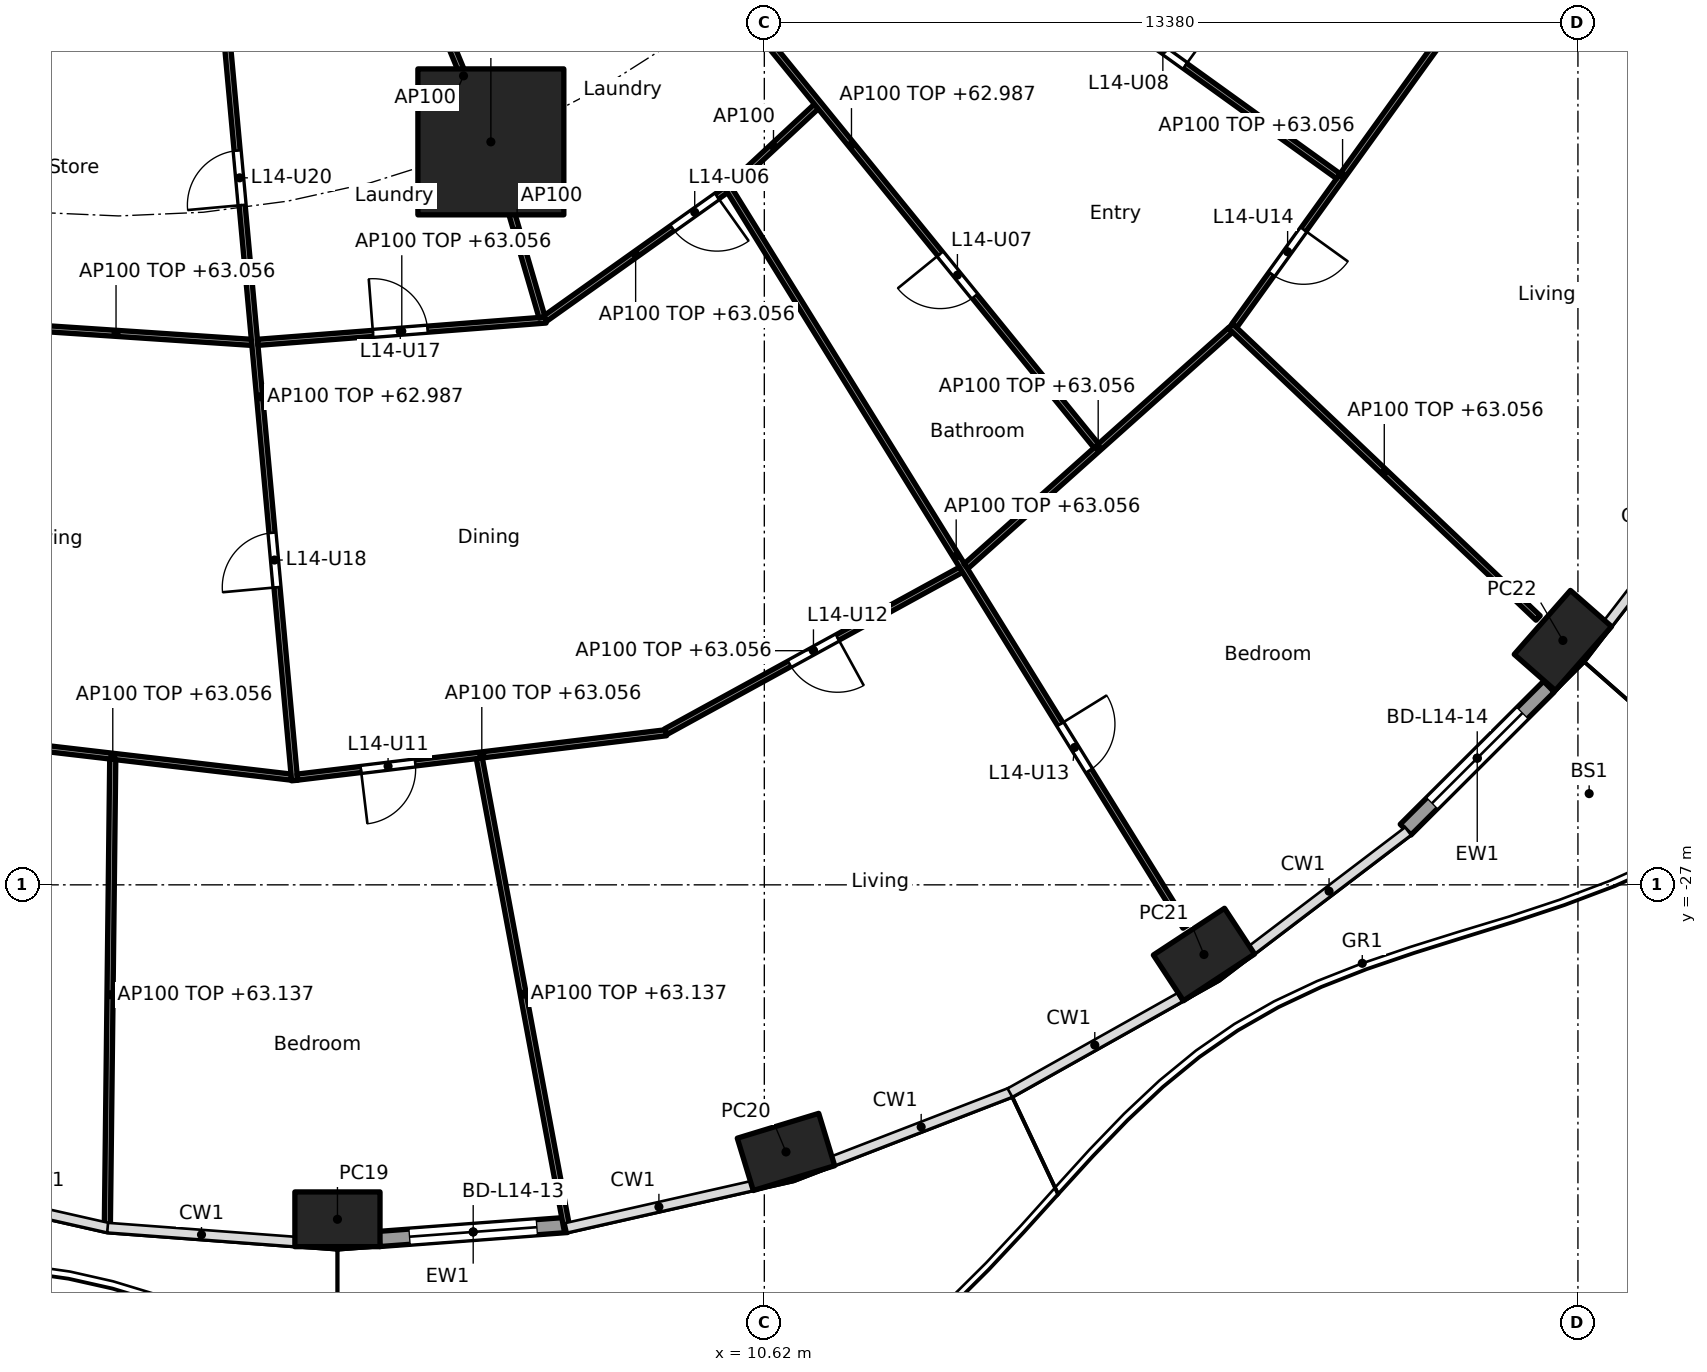
"""IFC4 building model, lengths in metres.
Left out: names, types, materials, properties, quantities, classifications, styles, units other than length and angle.
Written with IfcOpenShell. Run it as: python <this file> out.ifc"""

import sys

from ifc_helpers import new_model, si_unit, direction, frame, frame_2d, origin, origin_2d, place, context, subcontext, project, spatial, rectangle, hollow_rectangle, extrude, element, fill, save


model = new_model("IFC4")
c1 = context("Model", 3, precision=1e-05, world=origin(), true_north=direction((0.0, 1.0)))
c2 = subcontext(c1, "Body", "Model", "MODEL_VIEW")
j1 = project(units=[si_unit("LENGTHUNIT", "METRE"), si_unit("PLANEANGLEUNIT", "RADIAN")], contexts=[c1])
p1 = place(None, origin())
s1 = spatial("IfcSite", under=j1, at=p1, CompositionType="ELEMENT")
p2 = place(p1, origin())
s2 = spatial("IfcBuilding", under=s1, at=p2, CompositionType="ELEMENT")
p3 = place(p2, frame((0.0, 0.0, 60.3)))
s3 = spatial("IfcBuildingStorey", under=s2, at=p3, CompositionType="ELEMENT", Elevation=60.3)
for number, where, z_axis, x_axis in (
    (1, (3.6, -32.5, 0.0), (0.0, 0.0, 1.0), (1.0, 0.0, 0.0)),
    (2, (10.976, -31.393, 0.0), (0.0, 0.0, 1.0), (0.957, 0.292, 0.0)),
    (3, (17.85, -28.146, 0.0), (0.0, 0.0, 1.0), (0.836, 0.549, 0.0)),
    (4, (23.752, -22.981, 0.0), (0.0, 0.0, 1.0), (0.66, 0.751, 0.0)),
):
    element("IfcColumn", number, at=place(p3, frame(where, z_axis=z_axis, x_axis=x_axis)), inside=s3, PredefinedType="COLUMN", context=c2, shape_type="SweptSolid", body=[
        extrude(hollow_rectangle(XDim=1.4, YDim=0.9, WallThickness=0.05, at=origin_2d()), origin(), (0.0, 0.0, 1.0), 3.7),
    ])
p4 = place(p3, frame((6.123, -14.782, 0.0), z_axis=(0.0, 0.0, 1.0), x_axis=(1.0, 0.0, 0.0)))
e5 = element("IfcColumn", 5, at=p4, inside=s3, PredefinedType="COLUMN", context=c2, shape_type="SweptSolid", body=[
    extrude(rectangle(XDim=2.4, YDim=2.4, at=origin_2d()), origin(), (0.0, 0.0, 1.0), 3.7),
])
p5 = place(p3, frame((7.376, -32.593, 0.0), z_axis=(0.0, 0.0, 1.0), x_axis=(-0.997230834878, -0.074368420505, 0.0)))
e6 = element("IfcWall", 6, at=p5, inside=s3, PredefinedType="SOLIDWALL", context=c2, shape_type="SweptSolid", body=[
    extrude(rectangle(XDim=3.096, YDim=0.25, at=frame_2d((1.548, 0.0))), origin(), (0.0, 0.0, 1.0), 3.44),
])
p6 = place(p5, frame((0.498, 0.0, 0.0)))
e7 = element("IfcOpeningElement", 7, at=p6, cuts=e6, PredefinedType="OPENING", context=c2, shape_type="SweptSolid", body=[
    extrude(rectangle(XDim=2.1, YDim=2.4, at=frame_2d((1.05, 1.2))), frame((0.0, 0.135, 0.0), z_axis=(0.0, -1.0, 0.0), x_axis=(1.0, 0.0, 0.0)), (0.0, 0.0, 1.0), 0.27),
])
p7 = place(p3, frame((23.522, -23.74, 0.0), z_axis=(0.0, 0.0, 1.0), x_axis=(-0.707803094595, -0.706409781417, 0.0)))
e8 = element("IfcWall", 8, at=p7, inside=s3, PredefinedType="SOLIDWALL", context=c2, shape_type="SweptSolid", body=[
    extrude(rectangle(XDim=3.329, YDim=0.25, at=frame_2d((1.665, 0.0))), origin(), (0.0, 0.0, 1.0), 3.44),
])
p8 = place(p7, frame((0.615, 0.0, 0.0)))
e9 = element("IfcOpeningElement", 9, at=p8, cuts=e8, PredefinedType="OPENING", context=c2, shape_type="SweptSolid", body=[
    extrude(rectangle(XDim=2.1, YDim=2.4, at=frame_2d((1.05, 1.2))), frame((0.0, 0.135, 0.0), z_axis=(0.0, -1.0, 0.0), x_axis=(1.0, 0.0, 0.0)), (0.0, 0.0, 1.0), 0.27),
])
p9 = place(p3, frame((-2.271, -17.782, 0.0), z_axis=(0.0, 0.0, 1.0), x_axis=(0.997791437766, -0.066424744789, 0.0)))
e10 = element("IfcWall", 10, at=p9, inside=s3, PredefinedType="PARTITIONING", context=c2, shape_type="SweptSolid", body=[
    extrude(rectangle(XDim=4.469, YDim=0.1, at=frame_2d((2.235, 0.0))), origin(), (0.0, 0.0, 1.0), 2.756),
])
p10 = place(p3, frame((-3.031, -24.543, 0.0), z_axis=(0.0, 0.0, 1.0), x_axis=(0.993255612046, -0.115945198862, 0.0)))
e11 = element("IfcWall", 11, at=p10, inside=s3, PredefinedType="PARTITIONING", context=c2, shape_type="SweptSolid", body=[
    extrude(rectangle(XDim=5.913, YDim=0.1, at=frame_2d((2.956, 0.0))), origin(), (0.0, 0.0, 1.0), 2.756),
])
p11 = place(p3, frame((-0.095, -24.936, 0.0), z_axis=(0.0, 0.0, 1.0), x_axis=(-0.011541331541, -0.999933396615, 0.0)))
e12 = element("IfcWall", 12, at=p11, inside=s3, PredefinedType="PARTITIONING", context=c2, shape_type="SweptSolid", body=[
    extrude(rectangle(XDim=7.742, YDim=0.1, at=frame_2d((3.871, 0.0))), origin(), (0.0, 0.0, 1.0), 2.837),
])
p12 = place(p3, frame((1.744, -12.664, 0.0), z_axis=(0.0, 0.0, 1.0), x_axis=(0.090893569001, -0.995860612292, 0.0)))
e13 = element("IfcWall", 13, at=p12, inside=s3, PredefinedType="PARTITIONING", context=c2, shape_type="SweptSolid", body=[
    extrude(rectangle(XDim=12.673, YDim=0.1, at=frame_2d((6.336, 0.0))), origin(), (0.0, 0.0, 1.0), 2.687),
])
p13 = place(p12, frame((8.582, 0.0, 0.0)))
e14 = element("IfcOpeningElement", 14, at=p13, cuts=e13, PredefinedType="OPENING", context=c2, shape_type="SweptSolid", body=[
    extrude(rectangle(XDim=0.9, YDim=2.1, at=frame_2d((0.45, 1.05))), frame((0.0, 0.06, 0.0), z_axis=(0.0, -1.0, 0.0), x_axis=(1.0, 0.0, 0.0)), (0.0, 0.0, 1.0), 0.12),
])
p14 = place(p12, frame((2.27, 0.0, 0.0)))
e15 = element("IfcOpeningElement", 15, at=p14, cuts=e13, PredefinedType="OPENING", context=c2, shape_type="SweptSolid", body=[
    extrude(rectangle(XDim=0.9, YDim=2.1, at=frame_2d((0.45, 1.05))), frame((0.0, 0.06, 0.0), z_axis=(0.0, -1.0, 0.0), x_axis=(1.0, 0.0, 0.0)), (0.0, 0.0, 1.0), 0.12),
])
p15 = place(p3, frame((2.288, -18.078, 0.0), z_axis=(0.0, 0.0, 1.0), x_axis=(0.997016297228, 0.077191340583, 0.0)))
e16 = element("IfcWall", 16, at=p15, inside=s3, PredefinedType="PARTITIONING", context=c2, shape_type="SweptSolid", body=[
    extrude(rectangle(XDim=4.754, YDim=0.1, at=frame_2d((2.377, 0.0))), origin(), (0.0, 0.0, 1.0), 2.756),
])
p16 = place(p15, frame((1.902, 0.0, 0.0)))
e17 = element("IfcOpeningElement", 17, at=p16, cuts=e16, PredefinedType="OPENING", context=c2, shape_type="SweptSolid", body=[
    extrude(rectangle(XDim=0.9, YDim=2.1, at=frame_2d((0.45, 1.05))), frame((0.0, 0.06, 0.0), z_axis=(0.0, -1.0, 0.0), x_axis=(1.0, 0.0, 0.0)), (0.0, 0.0, 1.0), 0.12),
])
p17 = place(p3, frame((2.941, -25.229, 0.0), z_axis=(0.0, 0.0, 1.0), x_axis=(0.992836126149, 0.119484001497, 0.0)))
e18 = element("IfcWall", 18, at=p17, inside=s3, PredefinedType="PARTITIONING", context=c2, shape_type="SweptSolid", body=[
    extrude(rectangle(XDim=6.109, YDim=0.1, at=frame_2d((3.055, 0.0))), origin(), (0.0, 0.0, 1.0), 2.756),
])
p18 = place(p17, frame((1.052, 0.0, 0.0)))
e19 = element("IfcOpeningElement", 19, at=p18, cuts=e18, PredefinedType="OPENING", context=c2, shape_type="SweptSolid", body=[
    extrude(rectangle(XDim=0.9, YDim=2.1, at=frame_2d((0.45, 1.05))), frame((0.0, 0.06, 0.0), z_axis=(0.0, -1.0, 0.0), x_axis=(1.0, 0.0, 0.0)), (0.0, 0.0, 1.0), 0.12),
])
p19 = place(p3, frame((5.933, -24.919, 0.0), z_axis=(0.0, 0.0, 1.0), x_axis=(0.183018461258, -0.983109476528, 0.0)))
e20 = element("IfcWall", 20, at=p19, inside=s3, PredefinedType="PARTITIONING", context=c2, shape_type="SweptSolid", body=[
    extrude(rectangle(XDim=7.893, YDim=0.1, at=frame_2d((3.947, 0.0))), origin(), (0.0, 0.0, 1.0), 2.837),
])
p20 = place(p3, frame((5.243, -12.657, 0.0), z_axis=(0.0, 0.0, 1.0), x_axis=(0.382719158442, -0.923864733477, 0.0)))
e21 = element("IfcWall", 21, at=p20, inside=s3, PredefinedType="PARTITIONING", context=c2, shape_type="SweptSolid", body=[
    extrude(rectangle(XDim=2.25, YDim=0.1, at=frame_2d((1.125, 0.0))), origin(), (0.0, 0.0, 1.0), 3.44),
])
p21 = place(p3, frame((6.137, -14.83, 0.0), z_axis=(0.0, 0.0, 1.0), x_axis=(0.279888967793, -0.960032377427, 0.0)))
e22 = element("IfcWall", 22, at=p21, inside=s3, PredefinedType="PARTITIONING", context=c2, shape_type="SweptSolid", body=[
    extrude(rectangle(XDim=2.955, YDim=0.1, at=frame_2d((1.478, 0.0))), origin(), (0.0, 0.0, 1.0), 3.44),
])
p22 = place(p3, frame((7.019, -17.686, 0.0), z_axis=(0.0, 0.0, 1.0), x_axis=(0.81494477814, 0.57953861699, 0.0)))
e23 = element("IfcWall", 23, at=p22, inside=s3, PredefinedType="PARTITIONING", context=c2, shape_type="SweptSolid", body=[
    extrude(rectangle(XDim=3.644, YDim=0.1, at=frame_2d((1.822, 0.0))), origin(), (0.0, 0.0, 1.0), 2.756),
])
p23 = place(p22, frame((2.564, 0.0, 0.0)))
e24 = element("IfcOpeningElement", 24, at=p23, cuts=e23, PredefinedType="OPENING", context=c2, shape_type="SweptSolid", body=[
    extrude(rectangle(XDim=0.9, YDim=2.1, at=frame_2d((0.45, 1.05))), frame((0.0, 0.06, 0.0), z_axis=(0.0, -1.0, 0.0), x_axis=(1.0, 0.0, 0.0)), (0.0, 0.0, 1.0), 0.12),
])
p24 = place(p3, frame((9.001, -24.48, 0.0), z_axis=(0.0, 0.0, 1.0), x_axis=(0.876794415294, 0.480865421203, 0.0)))
e25 = element("IfcWall", 25, at=p24, inside=s3, PredefinedType="PARTITIONING", context=c2, shape_type="SweptSolid", body=[
    extrude(rectangle(XDim=5.536, YDim=0.1, at=frame_2d((2.768, 0.0))), origin(), (0.0, 0.0, 1.0), 2.756),
])
p25 = place(p24, frame((2.318, 0.0, 0.0)))
e26 = element("IfcOpeningElement", 26, at=p25, cuts=e25, PredefinedType="OPENING", context=c2, shape_type="SweptSolid", body=[
    extrude(rectangle(XDim=0.9, YDim=2.1, at=frame_2d((0.45, 1.05))), frame((0.0, 0.06, 0.0), z_axis=(0.0, -1.0, 0.0), x_axis=(1.0, 0.0, 0.0)), (0.0, 0.0, 1.0), 0.12),
])
p26 = place(p3, frame((10.003, -15.503, 0.0), z_axis=(0.0, 0.0, 1.0), x_axis=(0.526446106164, -0.850208502254, 0.0)))
e27 = element("IfcWall", 27, at=p26, inside=s3, PredefinedType="PARTITIONING", context=c2, shape_type="SweptSolid", body=[
    extrude(rectangle(XDim=14.33, YDim=0.1, at=frame_2d((7.165, 0.0))), origin(), (0.0, 0.0, 1.0), 2.756),
])
p27 = place(p26, frame((10.415, 0.0, 0.0)))
e28 = element("IfcOpeningElement", 28, at=p27, cuts=e27, PredefinedType="OPENING", context=c2, shape_type="SweptSolid", body=[
    extrude(rectangle(XDim=0.9, YDim=2.1, at=frame_2d((0.45, 1.05))), frame((0.0, 0.06, 0.0), z_axis=(0.0, -1.0, 0.0), x_axis=(1.0, 0.0, 0.0)), (0.0, 0.0, 1.0), 0.12),
])
p28 = place(p3, frame((10.066, -15.511, 0.0), z_axis=(0.0, 0.0, 1.0), x_axis=(0.73201609945, 0.681287333029, 0.0)))
e29 = element("IfcWall", 29, at=p28, inside=s3, PredefinedType="PARTITIONING", context=c2, shape_type="SweptSolid", body=[
    extrude(rectangle(XDim=1.925, YDim=0.1, at=frame_2d((0.962, 0.0))), origin(), (0.0, 0.0, 1.0), 3.44),
])
p29 = place(p3, frame((13.936, -21.761, 0.0), z_axis=(0.0, 0.0, 1.0), x_axis=(0.745806142791, 0.666163041136, 0.0)))
e30 = element("IfcWall", 30, at=p29, inside=s3, PredefinedType="PARTITIONING", context=c2, shape_type="SweptSolid", body=[
    extrude(rectangle(XDim=5.831, YDim=0.1, at=frame_2d((2.915, 0.0))), origin(), (0.0, 0.0, 1.0), 2.756),
])
p30 = place(p3, frame((8.028, -9.882, 0.0), z_axis=(0.0, 0.0, 1.0), x_axis=(0.631035554955, -0.77575390968, 0.0)))
e31 = element("IfcWall", 31, at=p30, inside=s3, PredefinedType="PARTITIONING", context=c2, shape_type="SweptSolid", body=[
    extrude(rectangle(XDim=12.759, YDim=0.1, at=frame_2d((6.379, 0.0))), origin(), (0.0, 0.0, 1.0), 2.687),
])
p31 = place(p30, frame((2.311, 0.0, 0.0)))
e32 = element("IfcOpeningElement", 32, at=p31, cuts=e31, PredefinedType="OPENING", context=c2, shape_type="SweptSolid", body=[
    extrude(rectangle(XDim=0.9, YDim=2.1, at=frame_2d((0.45, 1.05))), frame((0.0, 0.06, 0.0), z_axis=(0.0, -1.0, 0.0), x_axis=(1.0, 0.0, 0.0)), (0.0, 0.0, 1.0), 0.12),
])
p32 = place(p30, frame((8.69, 0.0, 0.0)))
e33 = element("IfcOpeningElement", 33, at=p32, cuts=e31, PredefinedType="OPENING", context=c2, shape_type="SweptSolid", body=[
    extrude(rectangle(XDim=0.9, YDim=2.1, at=frame_2d((0.45, 1.05))), frame((0.0, 0.06, 0.0), z_axis=(0.0, -1.0, 0.0), x_axis=(1.0, 0.0, 0.0)), (0.0, 0.0, 1.0), 0.12),
])
p33 = place(p3, frame((18.286, -17.809, 0.0), z_axis=(0.0, 0.0, 1.0), x_axis=(0.725242309581, -0.688493712676, 0.0)))
e34 = element("IfcWall", 34, at=p33, inside=s3, PredefinedType="PARTITIONING", context=c2, shape_type="SweptSolid", body=[
    extrude(rectangle(XDim=6.976, YDim=0.1, at=frame_2d((3.488, 0.0))), origin(), (0.0, 0.0, 1.0), 2.756),
])
p34 = place(p3, frame((18.351, -17.803, 0.0), z_axis=(0.0, 0.0, 1.0), x_axis=(0.584558392935, 0.811351640936, 0.0)))
e35 = element("IfcWall", 35, at=p34, inside=s3, PredefinedType="PARTITIONING", context=c2, shape_type="SweptSolid", body=[
    extrude(rectangle(XDim=6.084, YDim=0.1, at=frame_2d((3.042, 0.0))), origin(), (0.0, 0.0, 1.0), 2.756),
])
p35 = place(p34, frame((1.046, 0.0, 0.0)))
e36 = element("IfcOpeningElement", 36, at=p35, cuts=e35, PredefinedType="OPENING", context=c2, shape_type="SweptSolid", body=[
    extrude(rectangle(XDim=0.9, YDim=2.1, at=frame_2d((0.45, 1.05))), frame((0.0, 0.06, 0.0), z_axis=(0.0, -1.0, 0.0), x_axis=(1.0, 0.0, 0.0)), (0.0, 0.0, 1.0), 0.12),
])
p36 = place(p3, frame((9.886, -8.023, 0.0), z_axis=(0.0, 0.0, 1.0), x_axis=(0.811615973871, -0.58419133078, 0.0)))
e37 = element("IfcWall", 37, at=p36, inside=s3, PredefinedType="PARTITIONING", context=c2, shape_type="SweptSolid", body=[
    extrude(rectangle(XDim=12.535, YDim=0.1, at=frame_2d((6.268, 0.0))), origin(), (0.0, 0.0, 1.0), 2.687),
])
p37 = place(p36, frame((2.262, 0.0, 0.0)))
e38 = element("IfcOpeningElement", 38, at=p37, cuts=e37, PredefinedType="OPENING", context=c2, shape_type="SweptSolid", body=[
    extrude(rectangle(XDim=0.9, YDim=2.1, at=frame_2d((0.45, 1.05))), frame((0.0, 0.06, 0.0), z_axis=(0.0, -1.0, 0.0), x_axis=(1.0, 0.0, 0.0)), (0.0, 0.0, 1.0), 0.12),
])
p38 = place(p36, frame((8.53, 0.0, 0.0)))
e39 = element("IfcOpeningElement", 39, at=p38, cuts=e37, PredefinedType="OPENING", context=c2, shape_type="SweptSolid", body=[
    extrude(rectangle(XDim=0.9, YDim=2.1, at=frame_2d((0.45, 1.05))), frame((0.0, 0.06, 0.0), z_axis=(0.0, -1.0, 0.0), x_axis=(1.0, 0.0, 0.0)), (0.0, 0.0, 1.0), 0.12),
])
p39 = place(p6, origin())
e40 = element("IfcDoor", 40, at=p39, inside=s3, OperationType="SLIDING_TO_LEFT", PredefinedType="DOOR", context=c2, shape_type="SweptSolid", body=[
    extrude(rectangle(XDim=2.1, YDim=2.4, at=frame_2d((1.05, 1.2))), frame((0.0, 0.025, 0.0), z_axis=(0.0, -1.0, 0.0), x_axis=(1.0, 0.0, 0.0)), (0.0, 0.0, 1.0), 0.05),
])
fill(e7, e40)
p40 = place(p8, origin())
e41 = element("IfcDoor", 41, at=p40, inside=s3, OperationType="SLIDING_TO_LEFT", PredefinedType="DOOR", context=c2, shape_type="SweptSolid", body=[
    extrude(rectangle(XDim=2.1, YDim=2.4, at=frame_2d((1.05, 1.2))), frame((0.0, 0.025, 0.0), z_axis=(0.0, -1.0, 0.0), x_axis=(1.0, 0.0, 0.0)), (0.0, 0.0, 1.0), 0.05),
])
fill(e9, e41)
p41 = place(p23, frame((0.9, 0.0, 0.0), x_axis=(-1.0, 0.0, 0.0)))
e42 = element("IfcDoor", 42, at=p41, inside=s3, OperationType="SINGLE_SWING_LEFT", PredefinedType="DOOR", context=c2, shape_type="SweptSolid", body=[
    extrude(rectangle(XDim=0.9, YDim=2.1, at=frame_2d((0.45, 1.05))), frame((0.0, 0.025, 0.0), z_axis=(0.0, -1.0, 0.0), x_axis=(1.0, 0.0, 0.0)), (0.0, 0.0, 1.0), 0.05),
])
fill(e24, e42)
p42 = place(p32, frame((0.9, 0.0, 0.0), x_axis=(-1.0, 0.0, 0.0)))
e43 = element("IfcDoor", 43, at=p42, inside=s3, OperationType="SINGLE_SWING_RIGHT", PredefinedType="DOOR", context=c2, shape_type="SweptSolid", body=[
    extrude(rectangle(XDim=0.9, YDim=2.1, at=frame_2d((0.45, 1.05))), frame((0.0, 0.025, 0.0), z_axis=(0.0, -1.0, 0.0), x_axis=(1.0, 0.0, 0.0)), (0.0, 0.0, 1.0), 0.05),
])
fill(e33, e43)
p43 = place(p38, origin())
e44 = element("IfcDoor", 44, at=p43, inside=s3, OperationType="SINGLE_SWING_RIGHT", PredefinedType="DOOR", context=c2, shape_type="SweptSolid", body=[
    extrude(rectangle(XDim=0.9, YDim=2.1, at=frame_2d((0.45, 1.05))), frame((0.0, 0.025, 0.0), z_axis=(0.0, -1.0, 0.0), x_axis=(1.0, 0.0, 0.0)), (0.0, 0.0, 1.0), 0.05),
])
fill(e39, e44)
p44 = place(p18, frame((0.9, 0.0, 0.0), x_axis=(-1.0, 0.0, 0.0)))
e45 = element("IfcDoor", 45, at=p44, inside=s3, OperationType="SINGLE_SWING_RIGHT", PredefinedType="DOOR", context=c2, shape_type="SweptSolid", body=[
    extrude(rectangle(XDim=0.9, YDim=2.1, at=frame_2d((0.45, 1.05))), frame((0.0, 0.025, 0.0), z_axis=(0.0, -1.0, 0.0), x_axis=(1.0, 0.0, 0.0)), (0.0, 0.0, 1.0), 0.05),
])
fill(e19, e45)
p45 = place(p25, frame((0.9, 0.0, 0.0), x_axis=(-1.0, 0.0, 0.0)))
e46 = element("IfcDoor", 46, at=p45, inside=s3, OperationType="SINGLE_SWING_LEFT", PredefinedType="DOOR", context=c2, shape_type="SweptSolid", body=[
    extrude(rectangle(XDim=0.9, YDim=2.1, at=frame_2d((0.45, 1.05))), frame((0.0, 0.025, 0.0), z_axis=(0.0, -1.0, 0.0), x_axis=(1.0, 0.0, 0.0)), (0.0, 0.0, 1.0), 0.05),
])
fill(e26, e46)
p46 = place(p27, origin())
e47 = element("IfcDoor", 47, at=p46, inside=s3, OperationType="SINGLE_SWING_LEFT", PredefinedType="DOOR", context=c2, shape_type="SweptSolid", body=[
    extrude(rectangle(XDim=0.9, YDim=2.1, at=frame_2d((0.45, 1.05))), frame((0.0, 0.025, 0.0), z_axis=(0.0, -1.0, 0.0), x_axis=(1.0, 0.0, 0.0)), (0.0, 0.0, 1.0), 0.05),
])
fill(e28, e47)
p47 = place(p35, frame((0.9, 0.0, 0.0), x_axis=(-1.0, 0.0, 0.0)))
e48 = element("IfcDoor", 48, at=p47, inside=s3, OperationType="SINGLE_SWING_LEFT", PredefinedType="DOOR", context=c2, shape_type="SweptSolid", body=[
    extrude(rectangle(XDim=0.9, YDim=2.1, at=frame_2d((0.45, 1.05))), frame((0.0, 0.025, 0.0), z_axis=(0.0, -1.0, 0.0), x_axis=(1.0, 0.0, 0.0)), (0.0, 0.0, 1.0), 0.05),
])
fill(e36, e48)
p48 = place(p16, origin())
e49 = element("IfcDoor", 49, at=p48, inside=s3, OperationType="SINGLE_SWING_LEFT", PredefinedType="DOOR", context=c2, shape_type="SweptSolid", body=[
    extrude(rectangle(XDim=0.9, YDim=2.1, at=frame_2d((0.45, 1.05))), frame((0.0, 0.025, 0.0), z_axis=(0.0, -1.0, 0.0), x_axis=(1.0, 0.0, 0.0)), (0.0, 0.0, 1.0), 0.05),
])
fill(e17, e49)
p49 = place(p13, frame((0.9, 0.0, 0.0), x_axis=(-1.0, 0.0, 0.0)))
e50 = element("IfcDoor", 50, at=p49, inside=s3, OperationType="SINGLE_SWING_LEFT", PredefinedType="DOOR", context=c2, shape_type="SweptSolid", body=[
    extrude(rectangle(XDim=0.9, YDim=2.1, at=frame_2d((0.45, 1.05))), frame((0.0, 0.025, 0.0), z_axis=(0.0, -1.0, 0.0), x_axis=(1.0, 0.0, 0.0)), (0.0, 0.0, 1.0), 0.05),
])
fill(e14, e50)
p50 = place(p14, frame((0.9, 0.0, 0.0), x_axis=(-1.0, 0.0, 0.0)))
e51 = element("IfcDoor", 51, at=p50, inside=s3, OperationType="SINGLE_SWING_LEFT", PredefinedType="DOOR", context=c2, shape_type="SweptSolid", body=[
    extrude(rectangle(XDim=0.9, YDim=2.1, at=frame_2d((0.45, 1.05))), frame((0.0, 0.025, 0.0), z_axis=(0.0, -1.0, 0.0), x_axis=(1.0, 0.0, 0.0)), (0.0, 0.0, 1.0), 0.05),
])
fill(e15, e51)
save(model, sys.argv[1])
